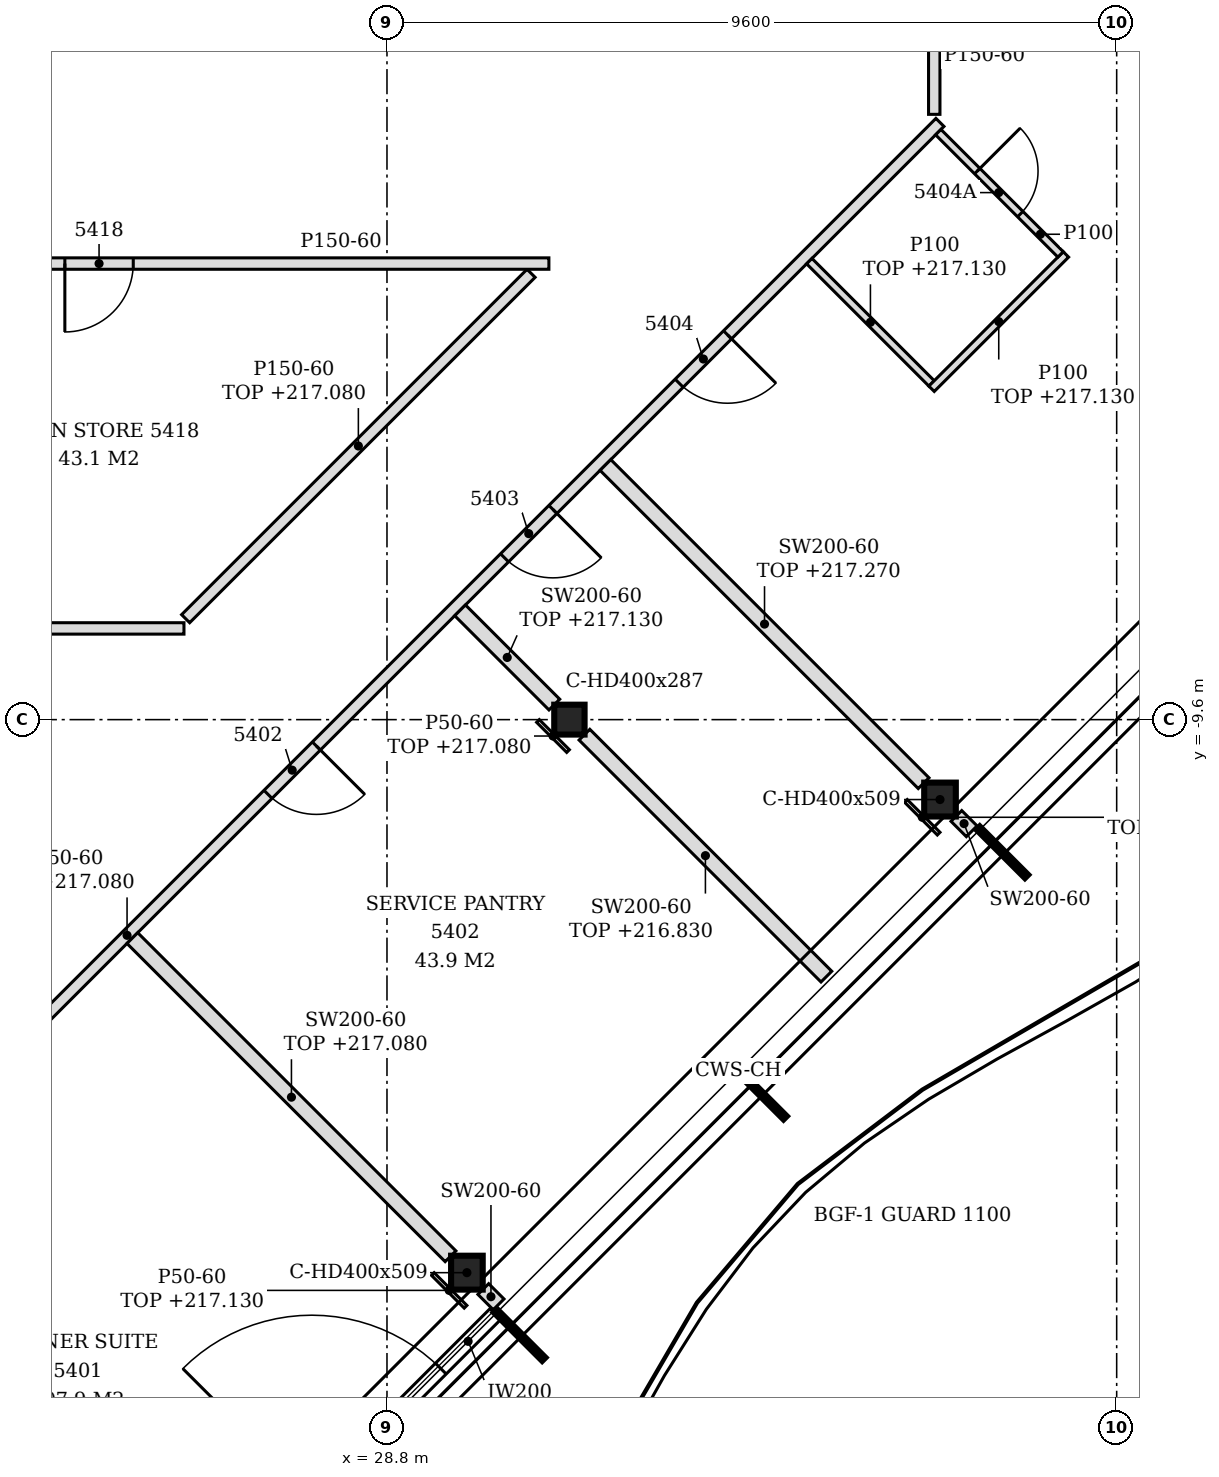
"""IFC4 building model, lengths in metres.
Left out: names, types, materials, properties, quantities, classifications, styles, units other than length and angle.
Written with IfcOpenShell. Run it as: python <this file> out.ifc"""

import sys

from ifc_helpers import new_model, si_unit, direction, frame, frame_2d, origin, origin_2d, place, context, subcontext, project, spatial, polyline, rectangle, i_section, outline, extrude, element, fill, save


model = new_model("IFC4")
c1 = context("Model", 3, precision=1e-05, world=origin(), true_north=direction((0.0, 1.0)))
c2 = subcontext(c1, "Body", "Model", "MODEL_VIEW")
j1 = project(units=[si_unit("LENGTHUNIT", "METRE"), si_unit("PLANEANGLEUNIT", "RADIAN")], contexts=[c1])
p1 = place(None, origin())
s1 = spatial("IfcSite", under=j1, at=p1, CompositionType="ELEMENT")
p2 = place(p1, origin())
s2 = spatial("IfcBuilding", under=s1, at=p2, CompositionType="ELEMENT")
p3 = place(p2, frame((0.0, 0.0, 214.2)))
s3 = spatial("IfcBuildingStorey", under=s2, at=p3, CompositionType="ELEMENT", Elevation=214.2)
for number, where, z_axis, x_axis in (
    (1, (29.852, -16.876, -0.15), (0.0, 0.0, 1.0), (1.0, 0.0, 0.0)),
    (2, (36.076, -10.652, -0.15), (0.0, 0.0, 1.0), (1.0, 0.0, 0.0)),
):
    element("IfcColumn", number, at=place(p3, frame(where, z_axis=z_axis, x_axis=x_axis)), inside=s3, PredefinedType="COLUMN", context=c2, shape_type="SweptSolid", body=[
        extrude(i_section(OverallWidth=0.416, OverallDepth=0.446, WebThickness=0.039, FlangeThickness=0.063, FilletRadius=0.015, at=origin_2d()), origin(), (0.0, 0.0, 1.0), 3.6),
    ])
p4 = place(p3, frame((31.2, -9.6, -0.15), z_axis=(0.0, 0.0, 1.0), x_axis=(1.0, 0.0, 0.0)))
e3 = element("IfcColumn", 3, at=p4, inside=s3, PredefinedType="COLUMN", context=c2, shape_type="SweptSolid", body=[
    extrude(i_section(OverallWidth=0.399, OverallDepth=0.393, WebThickness=0.023, FlangeThickness=0.037, FilletRadius=0.015, at=origin_2d()), origin(), (0.0, 0.0, 1.0), 3.6),
])
p5 = place(p3, frame((27.093, -20.553, 0.0), z_axis=(0.0, 0.0, 1.0), x_axis=(0.707079231393, 0.707134329907, 0.0)))
e4 = element("IfcWall", 4, at=p5, inside=s3, PredefinedType="NOTDEFINED", context=c2, shape_type="SweptSolid", body=[
    extrude(rectangle(XDim=4.431, YDim=0.2, at=frame_2d((2.215, 0.0))), origin(), (0.0, 0.0, 1.0), 3.45),
])
p6 = place(p5, frame((1.015, 0.0, 0.0)))
e5 = element("IfcOpeningElement", 5, at=p6, cuts=e4, PredefinedType="OPENING", context=c2, shape_type="SweptSolid", body=[
    extrude(rectangle(XDim=2.4, YDim=2.4, at=frame_2d((1.2, 1.2))), frame((0.0, 0.11, 0.0), z_axis=(0.0, -1.0, 0.0), x_axis=(1.0, 0.0, 0.0)), (0.0, 0.0, 1.0), 0.22),
])
p7 = place(p3, frame((30.269, -17.293, 0.0), z_axis=(0.0, 0.0, 1.0), x_axis=(-0.707106781187, 0.707106781187, 0.0)))
e6 = element("IfcWall", 6, at=p7, inside=s3, PredefinedType="PARTITIONING", context=c2, shape_type="SweptSolid", body=[
    extrude(rectangle(XDim=0.285, YDim=0.2, at=frame_2d((0.143, 0.0))), origin(), (0.0, 0.0, 1.0), 3.45),
])
p8 = place(p3, frame((21.146, -16.672, 0.0), z_axis=(0.0, 0.0, 1.0), x_axis=(0.707100999376, 0.70711256295, 0.0)))
e7 = element("IfcWall", 7, at=p8, inside=s3, PredefinedType="PARTITIONING", context=c2, shape_type="SweptSolid", body=[
    extrude(rectangle(XDim=21.113, YDim=0.15, at=frame_2d((10.556, 0.0))), origin(), (0.0, 0.0, 1.0), 2.88),
])
p9 = place(p8, frame((2.466, 0.0, 0.0)))
e8 = element("IfcOpeningElement", 8, at=p9, cuts=e7, PredefinedType="OPENING", context=c2, shape_type="SweptSolid", body=[
    extrude(rectangle(XDim=0.9, YDim=2.1, at=frame_2d((0.45, 1.05))), frame((0.0, 0.085, 0.0), z_axis=(0.0, -1.0, 0.0), x_axis=(1.0, 0.0, 0.0)), (0.0, 0.0, 1.0), 0.17),
])
p10 = place(p8, frame((8.611, 0.0, 0.0)))
e9 = element("IfcOpeningElement", 9, at=p10, cuts=e7, PredefinedType="OPENING", context=c2, shape_type="SweptSolid", body=[
    extrude(rectangle(XDim=0.9, YDim=2.1, at=frame_2d((0.45, 1.05))), frame((0.0, 0.085, 0.0), z_axis=(0.0, -1.0, 0.0), x_axis=(1.0, 0.0, 0.0)), (0.0, 0.0, 1.0), 0.17),
])
p11 = place(p8, frame((13.012, 0.0, 0.0)))
e10 = element("IfcOpeningElement", 10, at=p11, cuts=e7, PredefinedType="OPENING", context=c2, shape_type="SweptSolid", body=[
    extrude(rectangle(XDim=0.9, YDim=2.1, at=frame_2d((0.45, 1.05))), frame((0.0, 0.085, 0.0), z_axis=(0.0, -1.0, 0.0), x_axis=(1.0, 0.0, 0.0)), (0.0, 0.0, 1.0), 0.17),
])
p12 = place(p8, frame((16.261, 0.0, 0.0)))
e11 = element("IfcOpeningElement", 11, at=p12, cuts=e7, PredefinedType="OPENING", context=c2, shape_type="SweptSolid", body=[
    extrude(rectangle(XDim=0.9, YDim=2.1, at=frame_2d((0.45, 1.05))), frame((0.0, 0.085, 0.0), z_axis=(0.0, -1.0, 0.0), x_axis=(1.0, 0.0, 0.0)), (0.0, 0.0, 1.0), 0.17),
])
p13 = place(p3, frame((29.636, -16.66, 0.0), z_axis=(0.0, 0.0, 1.0), x_axis=(-0.707106781187, 0.707106781187, 0.0)))
e12 = element("IfcWall", 12, at=p13, inside=s3, PredefinedType="PARTITIONING", context=c2, shape_type="SweptSolid", body=[
    extrude(rectangle(XDim=5.92, YDim=0.2, at=frame_2d((2.96, 0.0))), origin(), (0.0, 0.0, 1.0), 2.88),
])
p14 = place(p3, frame((34.581, -12.981, 0.0), z_axis=(0.0, 0.0, 1.0), x_axis=(-0.707133900936, 0.707079660397, 0.0)))
e13 = element("IfcWall", 13, at=p14, inside=s3, PredefinedType="PARTITIONING", context=c2, shape_type="SweptSolid", body=[
    extrude(rectangle(XDim=4.501, YDim=0.2, at=frame_2d((2.25, 0.0))), origin(), (0.0, 0.0, 1.0), 2.63),
])
p15 = place(p3, frame((36.493, -11.069, 0.0), z_axis=(0.0, 0.0, 1.0), x_axis=(-0.707534423513, 0.706678880075, 0.0)))
e14 = element("IfcWall", 14, at=p15, inside=s3, PredefinedType="PARTITIONING", context=c2, shape_type="SweptSolid", body=[
    extrude(rectangle(XDim=0.285, YDim=0.2, at=frame_2d((0.143, 0.0))), origin(), (0.0, 0.0, 1.0), 3.45),
])
p16 = place(p3, frame((35.86, -10.436, 0.0), z_axis=(0.0, 0.0, 1.0), x_axis=(-0.707106781187, 0.707106781187, 0.0)))
e15 = element("IfcWall", 15, at=p16, inside=s3, PredefinedType="PARTITIONING", context=c2, shape_type="SweptSolid", body=[
    extrude(rectangle(XDim=5.92, YDim=0.2, at=frame_2d((2.96, 0.0))), origin(), (0.0, 0.0, 1.0), 3.07),
])
p17 = place(p3, frame((31.002, -9.402, 0.0), z_axis=(0.0, 0.0, 1.0), x_axis=(-0.707106781187, 0.707106781187, 0.0)))
e16 = element("IfcWall", 16, at=p17, inside=s3, PredefinedType="PARTITIONING", context=c2, shape_type="SweptSolid", body=[
    extrude(rectangle(XDim=1.754, YDim=0.2, at=frame_2d((0.877, 0.0))), origin(), (0.0, 0.0, 1.0), 2.93),
])
p18 = place(p3, frame((21.215, -8.4, 0.0), z_axis=(0.0, 0.0, 1.0), x_axis=(1.0, 0.0, 0.0)))
e17 = element("IfcWall", 17, at=p18, inside=s3, PredefinedType="PARTITIONING", context=c2, shape_type="SweptSolid", body=[
    extrude(rectangle(XDim=4.914, YDim=0.15, at=frame_2d((2.457, 0.0))), origin(), (0.0, 0.0, 1.0), 3.45),
])
p19 = place(p3, frame((26.151, -8.272, 0.0), z_axis=(0.0, 0.0, 1.0), x_axis=(0.707163762272, 0.707049795509, 0.0)))
e18 = element("IfcWall", 18, at=p19, inside=s3, PredefinedType="PARTITIONING", context=c2, shape_type="SweptSolid", body=[
    extrude(rectangle(XDim=6.427, YDim=0.15, at=frame_2d((3.213, 0.0))), origin(), (0.0, 0.0, 1.0), 2.88),
])
p20 = place(p3, frame((35.965, -5.177, 0.0), z_axis=(0.0, 0.0, 1.0), x_axis=(-0.707160441348, 0.707053116953, 0.0)))
e19 = element("IfcWall", 19, at=p20, inside=s3, PredefinedType="PARTITIONING", context=c2, shape_type="SweptSolid", body=[
    extrude(rectangle(XDim=2.275, YDim=0.1, at=frame_2d((1.137, 0.0))), origin(), (0.0, 0.0, 1.0), 2.93),
])
p21 = place(p3, frame((35.965, -5.247, 0.0), z_axis=(0.0, 0.0, 1.0), x_axis=(0.707155609469, 0.707057949532, 0.0)))
e20 = element("IfcWall", 20, at=p21, inside=s3, PredefinedType="PARTITIONING", context=c2, shape_type="SweptSolid", body=[
    extrude(rectangle(XDim=2.5, YDim=0.1, at=frame_2d((1.25, 0.0))), origin(), (0.0, 0.0, 1.0), 2.93),
])
p22 = place(p3, frame((19.125, -3.6, 0.0), z_axis=(0.0, 0.0, 1.0), x_axis=(1.0, 0.0, 0.0)))
e21 = element("IfcWall", 21, at=p22, inside=s3, PredefinedType="PARTITIONING", context=c2, shape_type="SweptSolid", body=[
    extrude(outline(polyline([(0.0, 0.0), (11.805, 0.0), (11.805, 3.45), (0.225, 3.45), (0.223, 2.83), (0.0, 2.83), (0.0, 0.0)])), frame((0.0, 0.075, 0.0), z_axis=(0.0, -1.0, 0.0), x_axis=(1.0, 0.0, 0.0)), (0.0, 0.0, 1.0), 0.15),
])
p23 = place(p22, frame((5.437, 0.0, 0.0)))
e22 = element("IfcOpeningElement", 22, at=p23, cuts=e21, PredefinedType="OPENING", context=c2, shape_type="SweptSolid", body=[
    extrude(rectangle(XDim=0.9, YDim=2.1, at=frame_2d((0.45, 1.05))), frame((0.0, 0.085, 0.0), z_axis=(0.0, -1.0, 0.0), x_axis=(1.0, 0.0, 0.0)), (0.0, 0.0, 1.0), 0.17),
])
p24 = place(p3, frame((37.662, -3.479, 0.0), z_axis=(0.0, 0.0, 1.0), x_axis=(-0.707160441348, 0.707053116953, 0.0)))
e23 = element("IfcWall", 23, at=p24, inside=s3, PredefinedType="PARTITIONING", context=c2, shape_type="SweptSolid", body=[
    extrude(rectangle(XDim=2.275, YDim=0.1, at=frame_2d((1.137, 0.0))), origin(), (0.0, 0.0, 1.0), 3.45),
])
p25 = place(p24, frame((0.75, 0.0, 0.0)))
e24 = element("IfcOpeningElement", 24, at=p25, cuts=e23, PredefinedType="OPENING", context=c2, shape_type="SweptSolid", body=[
    extrude(rectangle(XDim=0.8, YDim=2.1, at=frame_2d((0.4, 1.05))), frame((0.0, 0.06, 0.0), z_axis=(0.0, -1.0, 0.0), x_axis=(1.0, 0.0, 0.0)), (0.0, 0.0, 1.0), 0.12),
])
p26 = place(p3, frame((36.0, -1.637, 0.0), z_axis=(0.0, 0.0, 1.0), x_axis=(0.0, 1.0, 0.0)))
e25 = element("IfcWall", 25, at=p26, inside=s3, PredefinedType="PARTITIONING", context=c2, shape_type="SweptSolid", body=[
    extrude(outline(polyline([(0.0, 0.0), (1.537, 0.0), (1.537, 2.88), (1.532, 2.88), (1.53, 3.45), (0.0, 3.45), (0.0, 0.0)])), frame((0.0, 0.075, 0.0), z_axis=(0.0, -1.0, 0.0), x_axis=(1.0, 0.0, 0.0)), (0.0, 0.0, 1.0), 0.15),
])
p27 = place(p3, frame((29.834, -17.324, 0.0), z_axis=(0.0, 0.0, 1.0), x_axis=(-0.706906496032, 0.707307009627, 0.0)))
e26 = element("IfcWall", 26, at=p27, inside=s3, PredefinedType="PARTITIONING", context=c2, shape_type="SweptSolid", body=[
    extrude(rectangle(XDim=0.61, YDim=0.05, at=frame_2d((0.305, 0.0))), origin(), (0.0, 0.0, 1.0), 2.93),
])
p28 = place(p3, frame((31.182, -10.014, 0.0), z_axis=(0.0, 0.0, 1.0), x_axis=(-0.707106781187, 0.707106781187, 0.0)))
e27 = element("IfcWall", 27, at=p28, inside=s3, PredefinedType="PARTITIONING", context=c2, shape_type="SweptSolid", body=[
    extrude(rectangle(XDim=0.56, YDim=0.05, at=frame_2d((0.28, 0.0))), origin(), (0.0, 0.0, 1.0), 2.88),
])
p29 = place(p3, frame((36.058, -11.1, 0.0), z_axis=(0.0, 0.0, 1.0), x_axis=(-0.707307009627, 0.706906496032, 0.0)))
e28 = element("IfcWall", 28, at=p29, inside=s3, PredefinedType="PARTITIONING", context=c2, shape_type="SweptSolid", body=[
    extrude(rectangle(XDim=0.61, YDim=0.05, at=frame_2d((0.305, 0.0))), origin(), (0.0, 0.0, 1.0), 2.63),
])
p30 = place(p6, origin())
e29 = element("IfcDoor", 29, at=p30, inside=s3, OperationType="SINGLE_SWING_LEFT", PredefinedType="DOOR", context=c2, shape_type="SweptSolid", body=[
    extrude(rectangle(XDim=2.4, YDim=2.4, at=frame_2d((1.2, 1.2))), frame((0.0, 0.025, 0.0), z_axis=(0.0, -1.0, 0.0), x_axis=(1.0, 0.0, 0.0)), (0.0, 0.0, 1.0), 0.05),
])
fill(e5, e29)
p31 = place(p10, frame((0.9, 0.0, 0.0), z_axis=(0.0, 0.0, 1.0), x_axis=(-1.0, 0.0, 0.0)))
e30 = element("IfcDoor", 30, at=p31, inside=s3, OperationType="SINGLE_SWING_LEFT", PredefinedType="DOOR", context=c2, shape_type="SweptSolid", body=[
    extrude(rectangle(XDim=0.9, YDim=2.1, at=frame_2d((0.45, 1.05))), frame((0.0, 0.025, 0.0), z_axis=(0.0, -1.0, 0.0), x_axis=(1.0, 0.0, 0.0)), (0.0, 0.0, 1.0), 0.05),
])
fill(e9, e30)
p32 = place(p11, frame((0.9, 0.0, 0.0), z_axis=(0.0, 0.0, 1.0), x_axis=(-1.0, 0.0, 0.0)))
e31 = element("IfcDoor", 31, at=p32, inside=s3, OperationType="SINGLE_SWING_LEFT", PredefinedType="DOOR", context=c2, shape_type="SweptSolid", body=[
    extrude(rectangle(XDim=0.9, YDim=2.1, at=frame_2d((0.45, 1.05))), frame((0.0, 0.025, 0.0), z_axis=(0.0, -1.0, 0.0), x_axis=(1.0, 0.0, 0.0)), (0.0, 0.0, 1.0), 0.05),
])
fill(e10, e31)
p33 = place(p12, frame((0.9, 0.0, 0.0), z_axis=(0.0, 0.0, 1.0), x_axis=(-1.0, 0.0, 0.0)))
e32 = element("IfcDoor", 32, at=p33, inside=s3, OperationType="SINGLE_SWING_LEFT", PredefinedType="DOOR", context=c2, shape_type="SweptSolid", body=[
    extrude(rectangle(XDim=0.9, YDim=2.1, at=frame_2d((0.45, 1.05))), frame((0.0, 0.025, 0.0), z_axis=(0.0, -1.0, 0.0), x_axis=(1.0, 0.0, 0.0)), (0.0, 0.0, 1.0), 0.05),
])
fill(e11, e32)
p34 = place(p25, frame((0.8, 0.0, 0.0), z_axis=(0.0, 0.0, 1.0), x_axis=(-1.0, 0.0, 0.0)))
e33 = element("IfcDoor", 33, at=p34, inside=s3, OperationType="SINGLE_SWING_LEFT", PredefinedType="DOOR", context=c2, shape_type="SweptSolid", body=[
    extrude(rectangle(XDim=0.8, YDim=2.1, at=frame_2d((0.4, 1.05))), frame((0.0, 0.025, 0.0), z_axis=(0.0, -1.0, 0.0), x_axis=(1.0, 0.0, 0.0)), (0.0, 0.0, 1.0), 0.05),
])
fill(e24, e33)
p35 = place(p23, frame((0.9, 0.0, 0.0), z_axis=(0.0, 0.0, 1.0), x_axis=(-1.0, 0.0, 0.0)))
e34 = element("IfcDoor", 34, at=p35, inside=s3, OperationType="SINGLE_SWING_RIGHT", PredefinedType="DOOR", context=c2, shape_type="SweptSolid", body=[
    extrude(rectangle(XDim=0.9, YDim=2.1, at=frame_2d((0.45, 1.05))), frame((0.0, 0.025, 0.0), z_axis=(0.0, -1.0, 0.0), x_axis=(1.0, 0.0, 0.0)), (0.0, 0.0, 1.0), 0.05),
])
fill(e22, e34)
save(model, sys.argv[1])
